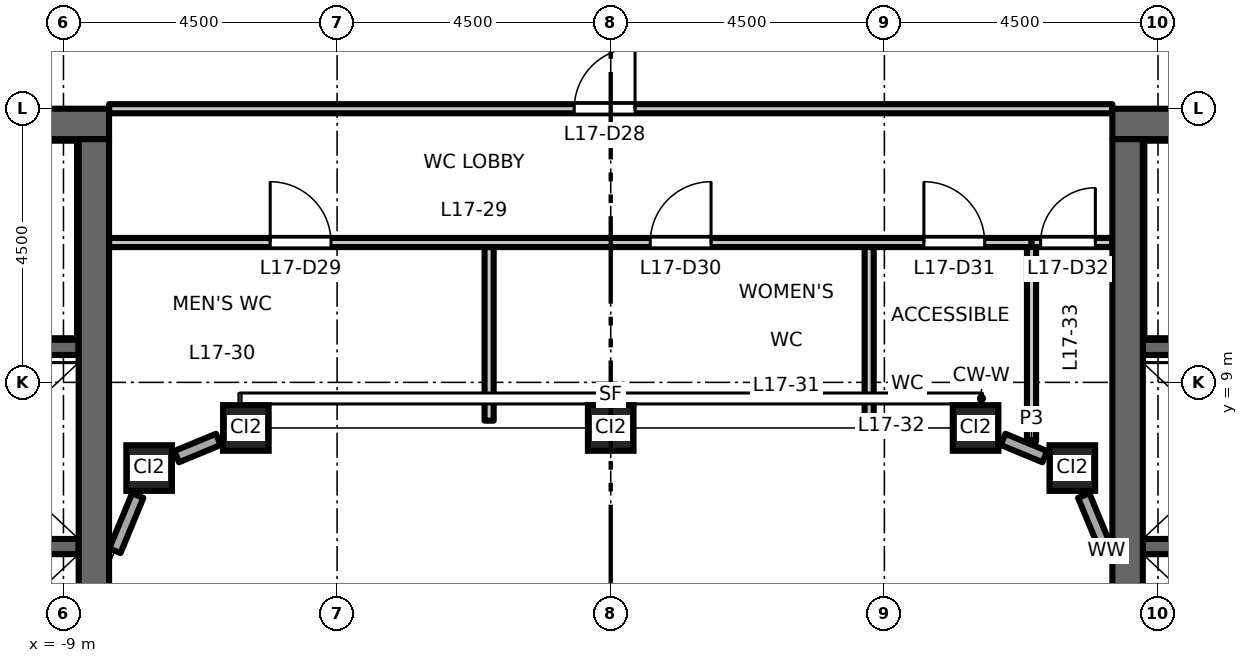
"""IFC4 building model, lengths in metres.
Left out: names, types, materials, properties, quantities, classifications, styles, units other than length and angle.
Written with IfcOpenShell. Run it as: python <this file> out.ifc"""

import sys

from ifc_helpers import new_model, si_unit, direction, frame, frame_2d, origin, origin_2d, place, context, subcontext, project, spatial, rectangle, hollow_rectangle, extrude, element, fill, save


model = new_model("IFC4")
c1 = context("Model", 3, precision=1e-05, world=origin(), true_north=direction((0.0, 1.0)))
c2 = subcontext(c1, "Body", "Model", "MODEL_VIEW")
j1 = project(units=[si_unit("LENGTHUNIT", "METRE"), si_unit("PLANEANGLEUNIT", "RADIAN")], contexts=[c1])
p1 = place(None, origin())
s1 = spatial("IfcSite", under=j1, at=p1, CompositionType="ELEMENT")
p2 = place(p1, origin())
s2 = spatial("IfcBuilding", under=s1, at=p2, CompositionType="ELEMENT")
p3 = place(p2, frame((0.0, 0.0, 80.7)))
s3 = spatial("IfcBuildingStorey", under=s2, at=p3, CompositionType="ELEMENT", Elevation=80.7)
for number, where, z_axis, x_axis in (
    (1, (-7.591, 7.591, 0.0), (0.0, 0.0, 1.0), (1.0, 0.0, 0.0)),
    (2, (-6.0, 8.25, 0.0), (0.0, 0.0, 1.0), (1.0, 0.0, 0.0)),
    (3, (0.0, 8.25, 0.0), (0.0, 0.0, 1.0), (1.0, 0.0, 0.0)),
    (4, (6.0, 8.25, 0.0), (0.0, 0.0, 1.0), (1.0, 0.0, 0.0)),
    (5, (7.591, 7.591, 0.0), (0.0, 0.0, 1.0), (1.0, 0.0, 0.0)),
):
    element("IfcColumn", number, at=place(p3, frame(where, z_axis=z_axis, x_axis=x_axis)), inside=s3, PredefinedType="COLUMN", context=c2, shape_type="SweptSolid", body=[
        extrude(hollow_rectangle(XDim=0.75, YDim=0.75, WallThickness=0.045, at=origin_2d()), origin(), (0.0, 0.0, 1.0), 4.5),
    ])
p4 = place(p3, frame((-8.75, 6.3, 0.0), z_axis=(0.0, 0.0, 1.0), x_axis=(-1.0, 0.0, 0.0)))
e6 = element("IfcWall", 6, at=p4, inside=s3, PredefinedType="SHEAR", context=c2, shape_type="SweptSolid", body=[
    extrude(rectangle(XDim=3.1, YDim=0.25, at=frame_2d((1.55, 0.0))), origin(), (0.0, 0.0, 1.0), 4.35),
])
p5 = place(p3, frame((-8.75, 9.575, 0.0), z_axis=(0.0, 0.0, 1.0), x_axis=(-1.0, 0.0, 0.0)))
e7 = element("IfcWall", 7, at=p5, inside=s3, PredefinedType="SHEAR", context=c2, shape_type="SweptSolid", body=[
    extrude(rectangle(XDim=8.0, YDim=0.25, at=frame_2d((4.0, 0.0))), origin(), (0.0, 0.0, 1.0), 4.35),
])
p6 = place(p5, frame((6.65, 0.0, 0.0)))
e8 = element("IfcOpeningElement", 8, at=p6, cuts=e7, PredefinedType="OPENING", context=c2, shape_type="SweptSolid", body=[
    extrude(rectangle(XDim=1.1, YDim=2.1, at=frame_2d((0.55, 1.05))), frame((0.0, 0.135, 0.0), z_axis=(0.0, -1.0, 0.0), x_axis=(1.0, 0.0, 0.0)), (0.0, 0.0, 1.0), 0.27),
])
p7 = place(p3, frame((-8.25, 13.25, 0.0), z_axis=(0.0, 0.0, 1.0), x_axis=(-1.0, 0.0, 0.0)))
e9 = element("IfcWall", 9, at=p7, inside=s3, PredefinedType="SHEAR", context=c2, shape_type="SweptSolid", body=[
    extrude(rectangle(XDim=13.5, YDim=0.5, at=frame_2d((6.75, 0.0))), origin(), (0.0, 0.0, 1.0), 4.35),
])
p8 = place(p3, frame((-8.5, -13.0, 0.0), z_axis=(0.0, 0.0, 1.0), x_axis=(0.0, 1.0, 0.0)))
e10 = element("IfcWall", 10, at=p8, inside=s3, PredefinedType="SHEAR", context=c2, shape_type="SweptSolid", body=[
    extrude(rectangle(XDim=26.0, YDim=0.5, at=frame_2d((13.0, 0.0))), origin(), (0.0, 0.0, 1.0), 4.35),
])
p9 = place(p3, frame((8.75, 6.3, 0.0), z_axis=(0.0, 0.0, 1.0), x_axis=(1.0, 0.0, 0.0)))
e11 = element("IfcWall", 11, at=p9, inside=s3, PredefinedType="SHEAR", context=c2, shape_type="SweptSolid", body=[
    extrude(rectangle(XDim=3.1, YDim=0.25, at=frame_2d((1.55, 0.0))), origin(), (0.0, 0.0, 1.0), 4.35),
])
p10 = place(p3, frame((8.75, 9.575, 0.0), z_axis=(0.0, 0.0, 1.0), x_axis=(1.0, 0.0, 0.0)))
e12 = element("IfcWall", 12, at=p10, inside=s3, PredefinedType="SHEAR", context=c2, shape_type="SweptSolid", body=[
    extrude(rectangle(XDim=8.0, YDim=0.25, at=frame_2d((4.0, 0.0))), origin(), (0.0, 0.0, 1.0), 4.35),
])
p11 = place(p10, frame((6.65, 0.0, 0.0)))
e13 = element("IfcOpeningElement", 13, at=p11, cuts=e12, PredefinedType="OPENING", context=c2, shape_type="SweptSolid", body=[
    extrude(rectangle(XDim=1.1, YDim=2.1, at=frame_2d((0.55, 1.05))), frame((0.0, 0.135, 0.0), z_axis=(0.0, -1.0, 0.0), x_axis=(1.0, 0.0, 0.0)), (0.0, 0.0, 1.0), 0.27),
])
p12 = place(p3, frame((8.25, 13.25, 0.0), z_axis=(0.0, 0.0, 1.0), x_axis=(1.0, 0.0, 0.0)))
e14 = element("IfcWall", 14, at=p12, inside=s3, PredefinedType="SHEAR", context=c2, shape_type="SweptSolid", body=[
    extrude(rectangle(XDim=13.5, YDim=0.5, at=frame_2d((6.75, 0.0))), origin(), (0.0, 0.0, 1.0), 4.35),
])
p13 = place(p3, frame((8.5, -13.0, 0.0), z_axis=(0.0, 0.0, 1.0), x_axis=(0.0, 1.0, 0.0)))
e15 = element("IfcWall", 15, at=p13, inside=s3, PredefinedType="SHEAR", context=c2, shape_type="SweptSolid", body=[
    extrude(rectangle(XDim=26.0, YDim=0.5, at=frame_2d((13.0, 0.0))), origin(), (0.0, 0.0, 1.0), 4.35),
])
p14 = place(p3, frame((8.154, 6.231, 0.0), z_axis=(0.0, 0.0, 1.0), x_axis=(-0.382549378284, 0.923935048136, 0.0)))
e16 = element("IfcWall", 16, at=p14, inside=s3, PredefinedType="STANDARD", context=c2, shape_type="SweptSolid", body=[
    extrude(rectangle(XDim=0.982, YDim=0.2, at=frame_2d((0.491, 0.0))), origin(), (0.0, 0.0, 1.0), 3.73),
])
for number, where, z_axis, x_axis in (
    (17, (7.138, 7.779, 0.0), (0.0, 0.0, 1.0), (-0.924, 0.383, 0.0)),
    (18, (-6.453, 8.062, 0.0), (0.0, 0.0, 1.0), (-0.924, -0.383, 0.0)),
):
    element("IfcWall", number, at=place(p3, frame(where, z_axis=z_axis, x_axis=x_axis)), inside=s3, PredefinedType="STANDARD", context=c2, shape_type="SweptSolid", body=[
        extrude(rectangle(XDim=0.742, YDim=0.2, at=frame_2d((0.371, 0.0))), origin(), (0.0, 0.0, 1.0), 3.73),
    ])
p15 = place(p3, frame((-7.779, 7.138, 0.0), z_axis=(0.0, 0.0, 1.0), x_axis=(-0.382549378284, -0.923935048136, 0.0)))
e19 = element("IfcWall", 19, at=p15, inside=s3, PredefinedType="STANDARD", context=c2, shape_type="SweptSolid", body=[
    extrude(rectangle(XDim=0.982, YDim=0.2, at=frame_2d((0.491, 0.0))), origin(), (0.0, 0.0, 1.0), 3.73),
])
p16 = place(p3, frame((-8.25, 11.3, 0.0), z_axis=(0.0, 0.0, 1.0), x_axis=(1.0, 0.0, 0.0)))
e20 = element("IfcWall", 20, at=p16, inside=s3, PredefinedType="PARTITIONING", context=c2, shape_type="SweptSolid", body=[
    extrude(rectangle(XDim=15.17, YDim=0.15, at=frame_2d((7.585, 0.0))), origin(), (0.0, 0.0, 1.0), 4.35),
])
p17 = place(p16, frame((2.65, 0.0, 0.0)))
e21 = element("IfcOpeningElement", 21, at=p17, cuts=e20, PredefinedType="OPENING", context=c2, shape_type="SweptSolid", body=[
    extrude(rectangle(XDim=1.0, YDim=2.1, at=frame_2d((0.5, 1.05))), frame((0.0, 0.085, 0.0), z_axis=(0.0, -1.0, 0.0), x_axis=(1.0, 0.0, 0.0)), (0.0, 0.0, 1.0), 0.17),
])
p18 = place(p16, frame((8.9, 0.0, 0.0)))
e22 = element("IfcOpeningElement", 22, at=p18, cuts=e20, PredefinedType="OPENING", context=c2, shape_type="SweptSolid", body=[
    extrude(rectangle(XDim=1.0, YDim=2.1, at=frame_2d((0.5, 1.05))), frame((0.0, 0.085, 0.0), z_axis=(0.0, -1.0, 0.0), x_axis=(1.0, 0.0, 0.0)), (0.0, 0.0, 1.0), 0.17),
])
p19 = place(p16, frame((13.4, 0.0, 0.0)))
e23 = element("IfcOpeningElement", 23, at=p19, cuts=e20, PredefinedType="OPENING", context=c2, shape_type="SweptSolid", body=[
    extrude(rectangle(XDim=1.0, YDim=2.1, at=frame_2d((0.5, 1.05))), frame((0.0, 0.085, 0.0), z_axis=(0.0, -1.0, 0.0), x_axis=(1.0, 0.0, 0.0)), (0.0, 0.0, 1.0), 0.17),
])
p20 = place(p3, frame((6.92, 11.3, 0.0), z_axis=(0.0, 0.0, 1.0), x_axis=(1.0, 0.0, 0.0)))
e24 = element("IfcWall", 24, at=p20, inside=s3, PredefinedType="PARTITIONING", context=c2, shape_type="SweptSolid", body=[
    extrude(rectangle(XDim=1.33, YDim=0.15, at=frame_2d((0.665, 0.0))), origin(), (0.0, 0.0, 1.0), 4.35),
])
p21 = place(p20, frame((0.15, 0.0, 0.0)))
e25 = element("IfcOpeningElement", 25, at=p21, cuts=e24, PredefinedType="OPENING", context=c2, shape_type="SweptSolid", body=[
    extrude(rectangle(XDim=0.9, YDim=2.1, at=frame_2d((0.45, 1.05))), frame((0.0, 0.085, 0.0), z_axis=(0.0, -1.0, 0.0), x_axis=(1.0, 0.0, 0.0)), (0.0, 0.0, 1.0), 0.17),
])
p22 = place(p3, frame((-8.25, 13.5, 0.0), z_axis=(0.0, 0.0, 1.0), x_axis=(1.0, 0.0, 0.0)))
e26 = element("IfcWall", 26, at=p22, inside=s3, PredefinedType="PARTITIONING", context=c2, shape_type="SweptSolid", body=[
    extrude(rectangle(XDim=16.5, YDim=0.15, at=frame_2d((8.25, 0.0))), origin(), (0.0, 0.0, 1.0), 3.85),
])
p23 = place(p22, frame((7.65, 0.0, 0.0)))
e27 = element("IfcOpeningElement", 27, at=p23, cuts=e26, PredefinedType="OPENING", context=c2, shape_type="SweptSolid", body=[
    extrude(rectangle(XDim=1.0, YDim=2.1, at=frame_2d((0.5, 1.05))), frame((0.0, 0.085, 0.0), z_axis=(0.0, -1.0, 0.0), x_axis=(1.0, 0.0, 0.0)), (0.0, 0.0, 1.0), 0.17),
])
for number, where, z_axis, x_axis in (
    (28, (-2.0, 8.37, 0.0), (0.0, 0.0, 1.0), (0.0, 1.0, 0.0)),
    (29, (4.25, 8.37, 0.0), (0.0, 0.0, 1.0), (0.0, 1.0, 0.0)),
):
    element("IfcWall", number, at=place(p3, frame(where, z_axis=z_axis, x_axis=x_axis)), inside=s3, PredefinedType="PARTITIONING", context=c2, shape_type="SweptSolid", body=[
        extrude(rectangle(XDim=2.855, YDim=0.15, at=frame_2d((1.427, 0.0))), origin(), (0.0, 0.0, 1.0), 4.35),
    ])
p24 = place(p3, frame((6.92, 8.028, 0.0), z_axis=(0.0, 0.0, 1.0), x_axis=(0.0, 1.0, 0.0)))
e30 = element("IfcWall", 30, at=p24, inside=s3, PredefinedType="PARTITIONING", context=c2, shape_type="SweptSolid", body=[
    extrude(rectangle(XDim=3.197, YDim=0.15, at=frame_2d((1.599, 0.0))), origin(), (0.0, 0.0, 1.0), 4.35),
])
p25 = place(p23, origin())
e31 = element("IfcDoor", 31, at=p25, inside=s3, OperationType="SINGLE_SWING_RIGHT", PredefinedType="DOOR", context=c2, shape_type="SweptSolid", body=[
    extrude(rectangle(XDim=1.0, YDim=2.1, at=frame_2d((0.5, 1.05))), frame((0.0, 0.025, 0.0), z_axis=(0.0, -1.0, 0.0), x_axis=(1.0, 0.0, 0.0)), (0.0, 0.0, 1.0), 0.05),
])
fill(e27, e31)
p26 = place(p17, origin())
e32 = element("IfcDoor", 32, at=p26, inside=s3, OperationType="SINGLE_SWING_LEFT", PredefinedType="DOOR", context=c2, shape_type="SweptSolid", body=[
    extrude(rectangle(XDim=1.0, YDim=2.1, at=frame_2d((0.5, 1.05))), frame((0.0, 0.025, 0.0), z_axis=(0.0, -1.0, 0.0), x_axis=(1.0, 0.0, 0.0)), (0.0, 0.0, 1.0), 0.05),
])
fill(e21, e32)
p27 = place(p18, origin())
e33 = element("IfcDoor", 33, at=p27, inside=s3, OperationType="SINGLE_SWING_RIGHT", PredefinedType="DOOR", context=c2, shape_type="SweptSolid", body=[
    extrude(rectangle(XDim=1.0, YDim=2.1, at=frame_2d((0.5, 1.05))), frame((0.0, 0.025, 0.0), z_axis=(0.0, -1.0, 0.0), x_axis=(1.0, 0.0, 0.0)), (0.0, 0.0, 1.0), 0.05),
])
fill(e22, e33)
p28 = place(p19, origin())
e34 = element("IfcDoor", 34, at=p28, inside=s3, OperationType="SINGLE_SWING_LEFT", PredefinedType="DOOR", context=c2, shape_type="SweptSolid", body=[
    extrude(rectangle(XDim=1.0, YDim=2.1, at=frame_2d((0.5, 1.05))), frame((0.0, 0.025, 0.0), z_axis=(0.0, -1.0, 0.0), x_axis=(1.0, 0.0, 0.0)), (0.0, 0.0, 1.0), 0.05),
])
fill(e23, e34)
p29 = place(p21, origin())
e35 = element("IfcDoor", 35, at=p29, inside=s3, OperationType="SINGLE_SWING_RIGHT", PredefinedType="DOOR", context=c2, shape_type="SweptSolid", body=[
    extrude(rectangle(XDim=0.9, YDim=2.1, at=frame_2d((0.45, 1.05))), frame((0.0, 0.025, 0.0), z_axis=(0.0, -1.0, 0.0), x_axis=(1.0, 0.0, 0.0)), (0.0, 0.0, 1.0), 0.05),
])
fill(e25, e35)
save(model, sys.argv[1])
